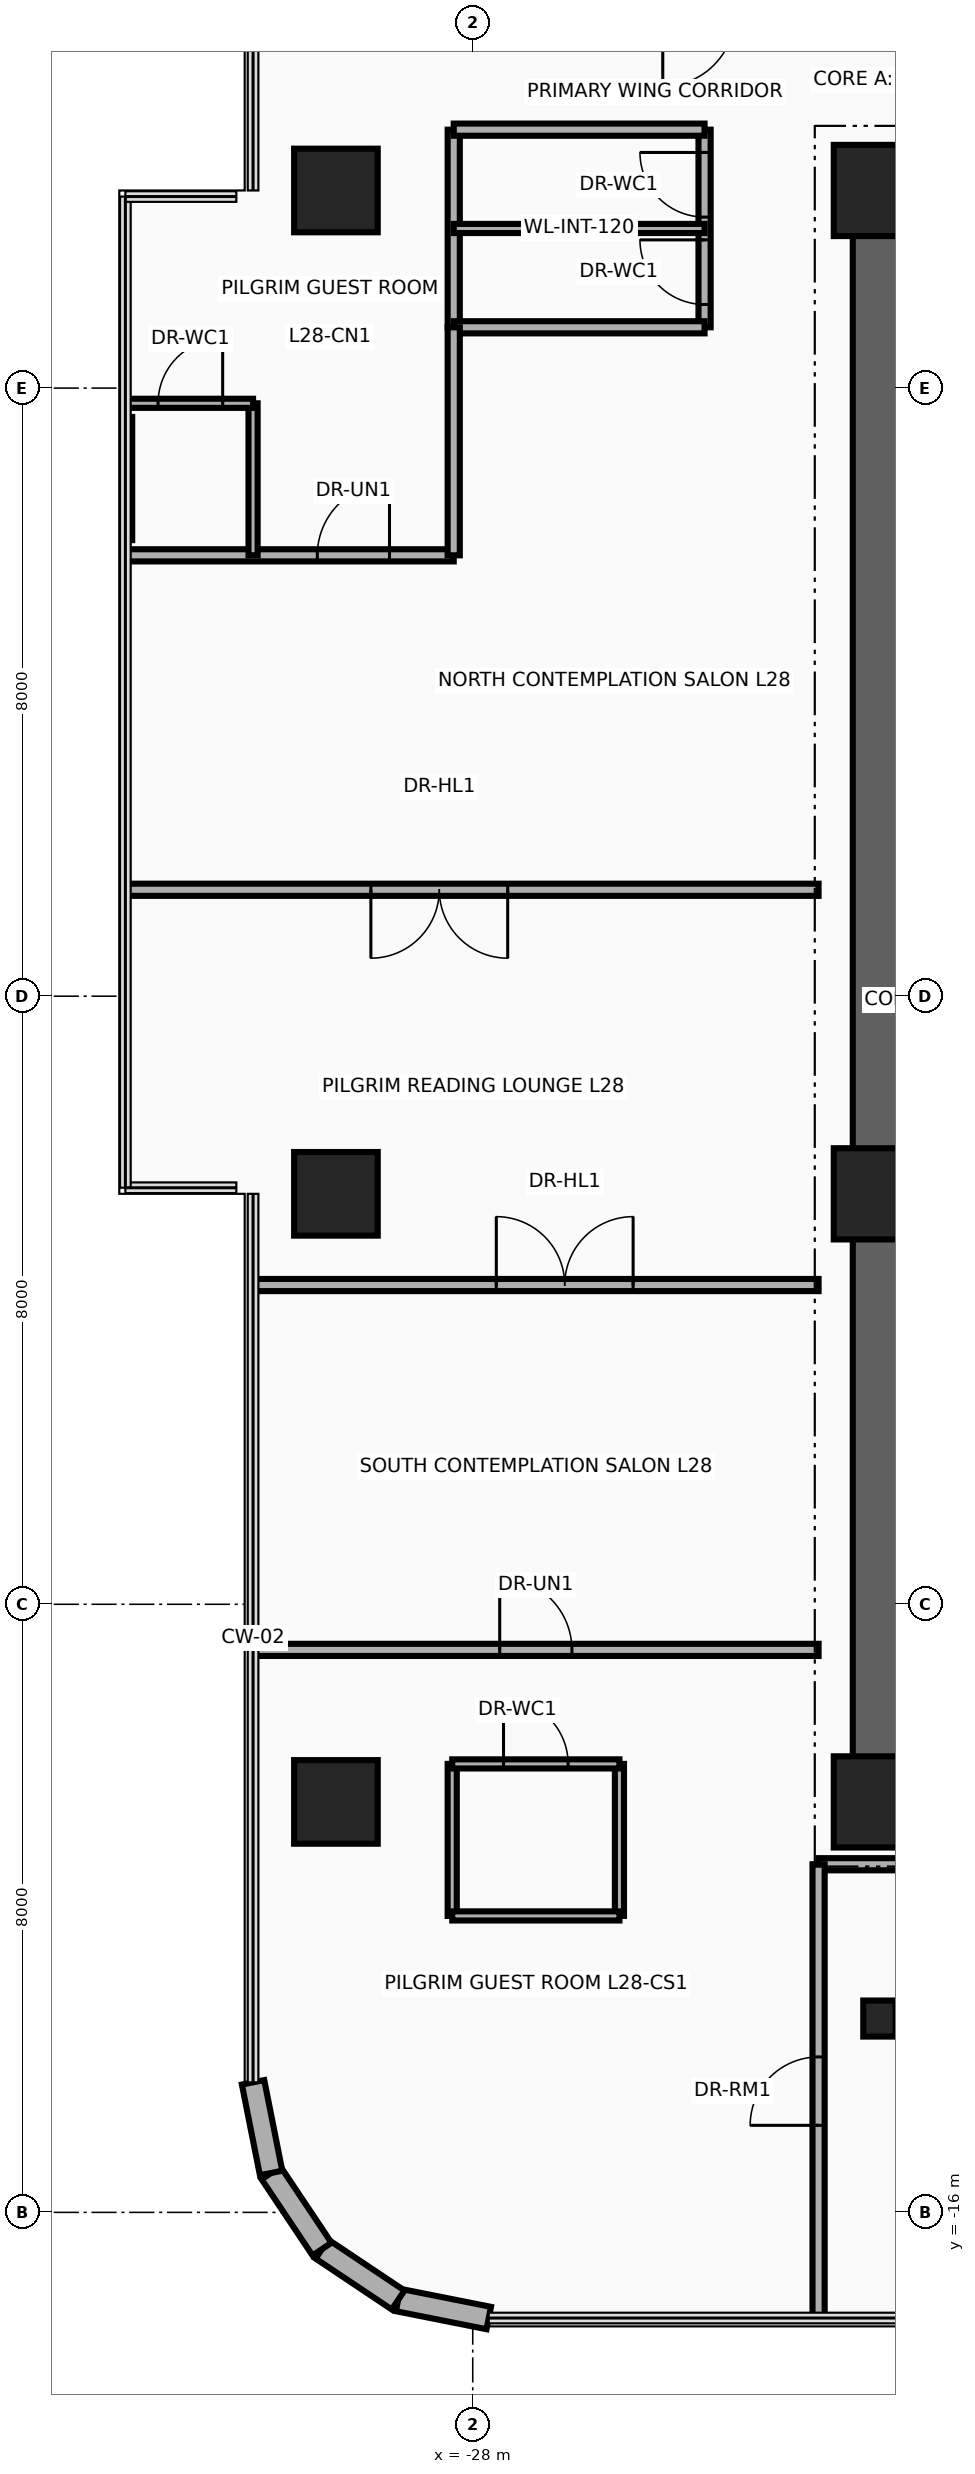
"""IFC4 building model, lengths in metres.
Left out: names, types, materials, properties, quantities, classifications, styles, units other than length and angle.
Written with IfcOpenShell. Run it as: python <this file> out.ifc"""

import sys

from ifc_helpers import new_model, si_unit, direction, frame, frame_2d, origin, origin_2d, place, context, subcontext, project, spatial, rectangle, circle, i_section, extrude, source, transform, mapped, element, fill, save


model = new_model("IFC4")
c1 = context("Model", 3, precision=1e-05, world=origin(), true_north=direction((0.0, 1.0)))
c2 = subcontext(c1, "Body", "Model", "MODEL_VIEW")
j1 = project(units=[si_unit("LENGTHUNIT", "METRE"), si_unit("PLANEANGLEUNIT", "RADIAN")], contexts=[c1])
p1 = place(None, origin())
s1 = spatial("IfcSite", under=j1, at=p1, CompositionType="ELEMENT")
p2 = place(p1, origin())
s2 = spatial("IfcBuilding", under=s1, at=p2, CompositionType="ELEMENT")
p3 = place(p2, frame((0.0, 0.0, 113.1)))
s3 = spatial("IfcBuildingStorey", under=s2, at=p3, CompositionType="ELEMENT", Elevation=113.1)
p4 = place(p3, frame((-22.65, -11.15, 0.0), z_axis=(0.0, 0.0, 1.0), x_axis=(0.0, 1.0, 0.0)))
e1 = element("IfcWall", 1, at=p4, inside=s3, PredefinedType="SHEAR", context=c2, shape_type="SweptSolid", body=[
    extrude(rectangle(XDim=22.3, YDim=0.7, at=frame_2d((11.15, 0.0))), origin(), (0.0, 0.0, 1.0), 3.46),
])
for number, where, z_axis, x_axis in (
    (2, (-22.65, 10.8, 0.0), (0.0, 0.0, 1.0), (1.0, 0.0, 0.0)),
    (3, (-22.65, -10.8, 0.0), (0.0, 0.0, 1.0), (1.0, 0.0, 0.0)),
):
    element("IfcWall", number, at=place(p3, frame(where, z_axis=z_axis, x_axis=x_axis)), inside=s3, PredefinedType="SHEAR", context=c2, shape_type="SweptSolid", body=[
        extrude(rectangle(XDim=10.25, YDim=0.7, at=frame_2d((5.125, 0.0))), origin(), (0.0, 0.0, 1.0), 3.46),
    ])
m1 = source(origin(), c2, "Body", "SweptSolid", [
    extrude(circle(Radius=0.55, at=origin_2d()), origin(), (0.0, 0.0, 1.0), 3.7),
])
p5 = place(p3, frame((-29.8, -10.6, 0.0), z_axis=(0.0, 0.0, 1.0), x_axis=(1.0, 0.0, 0.0)))
e4 = element("IfcColumn", 4, at=p5, inside=s3, PredefinedType="COLUMN", context=c2, shape_type="MappedRepresentation", body=[
    mapped(m1, transform((0.0, 0.0, 0.0), x_axis=(1.0, 0.0, 0.0), y_axis=(0.0, 1.0, 0.0), z_axis=(0.0, 0.0, 1.0), scale=1.0)),
])
m2 = source(origin(), c2, "Body", "SweptSolid", [
    extrude(rectangle(XDim=1.2, YDim=1.2, at=origin_2d()), origin(), (0.0, 0.0, 1.0), 3.7),
])
p6 = place(p3, frame((-22.65, -10.6, 0.0), z_axis=(0.0, 0.0, 1.0), x_axis=(1.0, 0.0, 0.0)))
e5 = element("IfcColumn", 5, at=p6, inside=s3, PredefinedType="COLUMN", context=c2, shape_type="MappedRepresentation", body=[
    mapped(m2, transform((0.0, 0.0, 0.0), x_axis=(1.0, 0.0, 0.0), y_axis=(0.0, 1.0, 0.0), z_axis=(0.0, 0.0, 1.0), scale=1.0)),
])
p7 = place(p3, frame((-29.8, -2.6, 0.0), z_axis=(0.0, 0.0, 1.0), x_axis=(1.0, 0.0, 0.0)))
e6 = element("IfcColumn", 6, at=p7, inside=s3, PredefinedType="COLUMN", context=c2, shape_type="MappedRepresentation", body=[
    mapped(m1, transform((0.0, 0.0, 0.0), x_axis=(1.0, 0.0, 0.0), y_axis=(0.0, 1.0, 0.0), z_axis=(0.0, 0.0, 1.0), scale=1.0)),
])
p8 = place(p3, frame((-22.65, -2.6, 0.0), z_axis=(0.0, 0.0, 1.0), x_axis=(1.0, 0.0, 0.0)))
e7 = element("IfcColumn", 7, at=p8, inside=s3, PredefinedType="COLUMN", context=c2, shape_type="MappedRepresentation", body=[
    mapped(m2, transform((0.0, 0.0, 0.0), x_axis=(1.0, 0.0, 0.0), y_axis=(0.0, 1.0, 0.0), z_axis=(0.0, 0.0, 1.0), scale=1.0)),
])
p9 = place(p3, frame((-29.8, 10.6, 0.0), z_axis=(0.0, 0.0, 1.0), x_axis=(1.0, 0.0, 0.0)))
e8 = element("IfcColumn", 8, at=p9, inside=s3, PredefinedType="COLUMN", context=c2, shape_type="MappedRepresentation", body=[
    mapped(m1, transform((0.0, 0.0, 0.0), x_axis=(1.0, 0.0, 0.0), y_axis=(0.0, 1.0, 0.0), z_axis=(0.0, 0.0, 1.0), scale=1.0)),
])
p10 = place(p3, frame((-22.65, 10.6, 0.0), z_axis=(0.0, 0.0, 1.0), x_axis=(1.0, 0.0, 0.0)))
e9 = element("IfcColumn", 9, at=p10, inside=s3, PredefinedType="COLUMN", context=c2, shape_type="MappedRepresentation", body=[
    mapped(m2, transform((0.0, 0.0, 0.0), x_axis=(1.0, 0.0, 0.0), y_axis=(0.0, 1.0, 0.0), z_axis=(0.0, 0.0, 1.0), scale=1.0)),
])
m3 = source(origin(), c2, "Body", "SweptSolid", [
    extrude(i_section(OverallWidth=0.424, OverallDepth=0.474, WebThickness=0.048, FlangeThickness=0.077, at=origin_2d()), origin(), (0.0, 0.0, 1.0), 3.7),
])
p11 = place(p3, frame((-22.65, -13.45, 0.0), z_axis=(0.0, 0.0, 1.0), x_axis=(1.0, 0.0, 0.0)))
e10 = element("IfcColumn", 10, at=p11, inside=s3, PredefinedType="COLUMN", context=c2, shape_type="MappedRepresentation", body=[
    mapped(m3, transform((0.0, 0.0, 0.0), x_axis=(1.0, 0.0, 0.0), y_axis=(0.0, 1.0, 0.0), z_axis=(0.0, 0.0, 1.0), scale=1.0)),
])
p12 = place(p3, frame((-27.789, -17.39, 0.0), z_axis=(0.0, 0.0, 1.0), x_axis=(-0.980804027463, 0.194996050505, 0.0)))
e11 = element("IfcWall", 11, at=p12, inside=s3, PredefinedType="SOLIDWALL", context=c2, shape_type="SweptSolid", body=[
    extrude(rectangle(XDim=1.216, YDim=0.3, at=frame_2d((0.608, 0.0))), origin(), (0.0, 0.0, 1.0), 3.46),
])
for number, where, z_axis, x_axis in (
    (12, (-28.982, -17.153, 0.0), (0.0, 0.0, 1.0), (-0.831, 0.556, 0.0)),
    (13, (-29.983, -16.483, 0.0), (0.0, 0.0, 1.0), (-0.556, 0.831, 0.0)),
):
    element("IfcWall", number, at=place(p3, frame(where, z_axis=z_axis, x_axis=x_axis)), inside=s3, PredefinedType="SOLIDWALL", context=c2, shape_type="SweptSolid", body=[
        extrude(rectangle(XDim=1.205, YDim=0.3, at=frame_2d((0.603, 0.0))), origin(), (0.0, 0.0, 1.0), 3.46),
    ])
p13 = place(p3, frame((-30.653, -15.482, 0.0), z_axis=(0.0, 0.0, 1.0), x_axis=(-0.194996050505, 0.980804027463, 0.0)))
e14 = element("IfcWall", 14, at=p13, inside=s3, PredefinedType="SOLIDWALL", context=c2, shape_type="SweptSolid", body=[
    extrude(rectangle(XDim=1.216, YDim=0.3, at=frame_2d((0.608, 0.0))), origin(), (0.0, 0.0, 1.0), 3.46),
])
p14 = place(p3, frame((-28.25, 8.8, 0.0), z_axis=(0.0, 0.0, 1.0), x_axis=(0.0, 1.0, 0.0)))
e15 = element("IfcWall", 15, at=p14, inside=s3, PredefinedType="PARTITIONING", context=c2, shape_type="SweptSolid", body=[
    extrude(rectangle(XDim=2.6, YDim=0.16, at=frame_2d((1.3, 0.0))), origin(), (0.0, 0.0, 1.0), 2.666),
])
p15 = place(p3, frame((-24.95, 8.8, 0.0), z_axis=(0.0, 0.0, 1.0), x_axis=(0.0, 1.0, 0.0)))
e16 = element("IfcWall", 16, at=p15, inside=s3, PredefinedType="PARTITIONING", context=c2, shape_type="SweptSolid", body=[
    extrude(rectangle(XDim=2.6, YDim=0.16, at=frame_2d((1.3, 0.0))), origin(), (0.0, 0.0, 1.0), 2.666),
])
p16 = place(p15, frame((0.3, 0.0, 0.0)))
e17 = element("IfcOpeningElement", 17, at=p16, cuts=e16, PredefinedType="OPENING", context=c2, shape_type="SweptSolid", body=[
    extrude(rectangle(XDim=0.85, YDim=2.1, at=frame_2d((0.425, 1.05))), frame((0.0, 0.095, 0.0), z_axis=(0.0, -1.0, 0.0), x_axis=(1.0, 0.0, 0.0)), (0.0, 0.0, 1.0), 0.19),
])
p17 = place(p15, frame((1.45, 0.0, 0.0)))
e18 = element("IfcOpeningElement", 18, at=p17, cuts=e16, PredefinedType="OPENING", context=c2, shape_type="SweptSolid", body=[
    extrude(rectangle(XDim=0.85, YDim=2.1, at=frame_2d((0.425, 1.05))), frame((0.0, 0.095, 0.0), z_axis=(0.0, -1.0, 0.0), x_axis=(1.0, 0.0, 0.0)), (0.0, 0.0, 1.0), 0.19),
])
for number, where, z_axis, x_axis in (
    (19, (-28.25, 8.8, 0.0), (0.0, 0.0, 1.0), (1.0, 0.0, 0.0)),
    (20, (-28.25, 11.4, 0.0), (0.0, 0.0, 1.0), (1.0, 0.0, 0.0)),
):
    element("IfcWall", number, at=place(p3, frame(where, z_axis=z_axis, x_axis=x_axis)), inside=s3, PredefinedType="PARTITIONING", context=c2, shape_type="SweptSolid", body=[
        extrude(rectangle(XDim=3.3, YDim=0.16, at=frame_2d((1.65, 0.0))), origin(), (0.0, 0.0, 1.0), 3.46),
    ])
p18 = place(p3, frame((-28.25, 10.1, 0.0), z_axis=(0.0, 0.0, 1.0), x_axis=(1.0, 0.0, 0.0)))
e21 = element("IfcWall", 21, at=p18, inside=s3, PredefinedType="PARTITIONING", context=c2, shape_type="SweptSolid", body=[
    extrude(rectangle(XDim=3.3, YDim=0.12, at=frame_2d((1.65, 0.0))), origin(), (0.0, 0.0, 1.0), 3.46),
])
p19 = place(p3, frame((-23.45, -11.42, 0.0), z_axis=(0.0, 0.0, 1.0), x_axis=(1.0, 0.0, 0.0)))
e22 = element("IfcWall", 22, at=p19, inside=s3, PredefinedType="PARTITIONING", context=c2, shape_type="SweptSolid", body=[
    extrude(rectangle(XDim=13.84, YDim=0.16, at=frame_2d((6.92, 0.0))), origin(), (0.0, 0.0, 1.0), 2.834),
])
p20 = place(p3, frame((-23.45, -17.39, 0.0), z_axis=(0.0, 0.0, 1.0), x_axis=(0.0, 1.0, 0.0)))
e23 = element("IfcWall", 23, at=p20, inside=s3, PredefinedType="PARTITIONING", context=c2, shape_type="SweptSolid", body=[
    extrude(rectangle(XDim=5.97, YDim=0.16, at=frame_2d((2.985, 0.0))), origin(), (0.0, 0.0, 1.0), 3.46),
])
p21 = place(p20, frame((2.535, 0.0, 0.0)))
e24 = element("IfcOpeningElement", 24, at=p21, cuts=e23, PredefinedType="OPENING", context=c2, shape_type="SweptSolid", body=[
    extrude(rectangle(XDim=0.9, YDim=2.1, at=frame_2d((0.45, 1.05))), frame((0.0, 0.095, 0.0), z_axis=(0.0, -1.0, 0.0), x_axis=(1.0, 0.0, 0.0)), (0.0, 0.0, 1.0), 0.19),
])
p22 = place(p3, frame((-30.89, -8.6, 0.0), z_axis=(0.0, 0.0, 1.0), x_axis=(1.0, 0.0, 0.0)))
e25 = element("IfcWall", 25, at=p22, inside=s3, PredefinedType="PARTITIONING", context=c2, shape_type="SweptSolid", body=[
    extrude(rectangle(XDim=7.44, YDim=0.16, at=frame_2d((3.72, 0.0))), origin(), (0.0, 0.0, 1.0), 2.896),
])
p23 = place(p22, frame((3.245, 0.0, 0.0)))
e26 = element("IfcOpeningElement", 26, at=p23, cuts=e25, PredefinedType="OPENING", context=c2, shape_type="SweptSolid", body=[
    extrude(rectangle(XDim=0.95, YDim=2.15, at=frame_2d((0.475, 1.075))), frame((0.0, 0.095, 0.0), z_axis=(0.0, -1.0, 0.0), x_axis=(1.0, 0.0, 0.0)), (0.0, 0.0, 1.0), 0.19),
])
p24 = place(p3, frame((-32.54, 5.8, 0.0), z_axis=(0.0, 0.0, 1.0), x_axis=(1.0, 0.0, 0.0)))
e27 = element("IfcWall", 27, at=p24, inside=s3, PredefinedType="PARTITIONING", context=c2, shape_type="SweptSolid", body=[
    extrude(rectangle(XDim=4.29, YDim=0.16, at=frame_2d((2.145, 0.0))), origin(), (0.0, 0.0, 1.0), 2.896),
])
p25 = place(p24, frame((2.495, 0.0, 0.0)))
e28 = element("IfcOpeningElement", 28, at=p25, cuts=e27, PredefinedType="OPENING", context=c2, shape_type="SweptSolid", body=[
    extrude(rectangle(XDim=0.95, YDim=2.15, at=frame_2d((0.475, 1.075))), frame((0.0, 0.095, 0.0), z_axis=(0.0, -1.0, 0.0), x_axis=(1.0, 0.0, 0.0)), (0.0, 0.0, 1.0), 0.19),
])
p26 = place(p3, frame((-28.25, 5.8, 0.0), z_axis=(0.0, 0.0, 1.0), x_axis=(0.0, 1.0, 0.0)))
e29 = element("IfcWall", 29, at=p26, inside=s3, PredefinedType="PARTITIONING", context=c2, shape_type="SweptSolid", body=[
    extrude(rectangle(XDim=3.0, YDim=0.16, at=frame_2d((1.5, 0.0))), origin(), (0.0, 0.0, 1.0), 2.988),
])
for number, where, z_axis, x_axis in (
    (30, (-28.27, -12.1, 0.0), (0.0, 0.0, 1.0), (0.0, 1.0, 0.0)),
    (31, (-26.07, -12.1, 0.0), (0.0, 0.0, 1.0), (0.0, 1.0, 0.0)),
):
    element("IfcWall", number, at=place(p3, frame(where, z_axis=z_axis, x_axis=x_axis)), inside=s3, PredefinedType="PARTITIONING", context=c2, shape_type="SweptSolid", body=[
        extrude(rectangle(XDim=2.0, YDim=0.12, at=frame_2d((1.0, 0.0))), origin(), (0.0, 0.0, 1.0), 2.666),
    ])
p27 = place(p3, frame((-28.27, -12.1, 0.0), z_axis=(0.0, 0.0, 1.0), x_axis=(1.0, 0.0, 0.0)))
e32 = element("IfcWall", 32, at=p27, inside=s3, PredefinedType="PARTITIONING", context=c2, shape_type="SweptSolid", body=[
    extrude(rectangle(XDim=2.2, YDim=0.12, at=frame_2d((1.1, 0.0))), origin(), (0.0, 0.0, 1.0), 3.46),
])
p28 = place(p3, frame((-28.27, -10.1, 0.0), z_axis=(0.0, 0.0, 1.0), x_axis=(1.0, 0.0, 0.0)))
e33 = element("IfcWall", 33, at=p28, inside=s3, PredefinedType="PARTITIONING", context=c2, shape_type="SweptSolid", body=[
    extrude(rectangle(XDim=2.2, YDim=0.12, at=frame_2d((1.1, 0.0))), origin(), (0.0, 0.0, 1.0), 3.46),
])
p29 = place(p28, frame((0.675, 0.0, 0.0)))
e34 = element("IfcOpeningElement", 34, at=p29, cuts=e33, PredefinedType="OPENING", context=c2, shape_type="SweptSolid", body=[
    extrude(rectangle(XDim=0.85, YDim=2.1, at=frame_2d((0.425, 1.05))), frame((0.0, 0.075, 0.0), z_axis=(0.0, -1.0, 0.0), x_axis=(1.0, 0.0, 0.0)), (0.0, 0.0, 1.0), 0.15),
])
p30 = place(p3, frame((-30.89, 5.8, 0.0), z_axis=(0.0, 0.0, 1.0), x_axis=(0.0, 1.0, 0.0)))
e35 = element("IfcWall", 35, at=p30, inside=s3, PredefinedType="PARTITIONING", context=c2, shape_type="SweptSolid", body=[
    extrude(rectangle(XDim=2.0, YDim=0.12, at=frame_2d((1.0, 0.0))), origin(), (0.0, 0.0, 1.0), 3.46),
])
p31 = place(p3, frame((-32.54, 7.8, 0.0), z_axis=(0.0, 0.0, 1.0), x_axis=(1.0, 0.0, 0.0)))
e36 = element("IfcWall", 36, at=p31, inside=s3, PredefinedType="PARTITIONING", context=c2, shape_type="SweptSolid", body=[
    extrude(rectangle(XDim=1.65, YDim=0.12, at=frame_2d((0.825, 0.0))), origin(), (0.0, 0.0, 1.0), 3.46),
])
p32 = place(p31, frame((0.4, 0.0, 0.0)))
e37 = element("IfcOpeningElement", 37, at=p32, cuts=e36, PredefinedType="OPENING", context=c2, shape_type="SweptSolid", body=[
    extrude(rectangle(XDim=0.85, YDim=2.1, at=frame_2d((0.425, 1.05))), frame((0.0, 0.075, 0.0), z_axis=(0.0, -1.0, 0.0), x_axis=(1.0, 0.0, 0.0)), (0.0, 0.0, 1.0), 0.15),
])
p33 = place(p3, frame((-32.54, 6.0, 0.0), z_axis=(0.0, 0.0, 1.0), x_axis=(0.0, 1.0, 0.0)))
e38 = element("IfcWall", 38, at=p33, inside=s3, PredefinedType="PARTITIONING", context=c2, shape_type="SweptSolid", body=[
    extrude(rectangle(XDim=1.62, YDim=0.12, at=frame_2d((0.81, 0.0))), origin(), (0.0, 0.0, 1.0), 3.46),
])
p34 = place(p3, frame((-30.89, -3.8, 0.0), z_axis=(0.0, 0.0, 1.0), x_axis=(1.0, 0.0, 0.0)))
e39 = element("IfcWall", 39, at=p34, inside=s3, PredefinedType="PARTITIONING", context=c2, shape_type="SweptSolid", body=[
    extrude(rectangle(XDim=7.44, YDim=0.16, at=frame_2d((3.72, 0.0))), origin(), (0.0, 0.0, 1.0), 2.896),
])
p35 = place(p34, frame((3.2, 0.0, 0.0)))
e40 = element("IfcOpeningElement", 40, at=p35, cuts=e39, PredefinedType="OPENING", context=c2, shape_type="SweptSolid", body=[
    extrude(rectangle(XDim=1.8, YDim=2.15, at=frame_2d((0.9, 1.075))), frame((0.0, 0.095, 0.0), z_axis=(0.0, -1.0, 0.0), x_axis=(1.0, 0.0, 0.0)), (0.0, 0.0, 1.0), 0.19),
])
p36 = place(p3, frame((-32.54, 1.4, 0.0), z_axis=(0.0, 0.0, 1.0), x_axis=(1.0, 0.0, 0.0)))
e41 = element("IfcWall", 41, at=p36, inside=s3, PredefinedType="PARTITIONING", context=c2, shape_type="SweptSolid", body=[
    extrude(rectangle(XDim=9.09, YDim=0.16, at=frame_2d((4.545, 0.0))), origin(), (0.0, 0.0, 1.0), 2.896),
])
p37 = place(p36, frame((3.2, 0.0, 0.0)))
e42 = element("IfcOpeningElement", 42, at=p37, cuts=e41, PredefinedType="OPENING", context=c2, shape_type="SweptSolid", body=[
    extrude(rectangle(XDim=1.8, YDim=2.15, at=frame_2d((0.9, 1.075))), frame((0.0, 0.095, 0.0), z_axis=(0.0, -1.0, 0.0), x_axis=(1.0, 0.0, 0.0)), (0.0, 0.0, 1.0), 0.19),
])
p38 = place(p16, origin())
e43 = element("IfcDoor", 43, at=p38, inside=s3, OperationType="SINGLE_SWING_RIGHT", PredefinedType="DOOR", context=c2, shape_type="SweptSolid", body=[
    extrude(rectangle(XDim=0.85, YDim=2.1, at=frame_2d((0.425, 1.05))), frame((0.0, 0.025, 0.0), z_axis=(0.0, -1.0, 0.0), x_axis=(1.0, 0.0, 0.0)), (0.0, 0.0, 1.0), 0.05),
])
fill(e17, e43)
p39 = place(p17, origin())
e44 = element("IfcDoor", 44, at=p39, inside=s3, OperationType="SINGLE_SWING_LEFT", PredefinedType="DOOR", context=c2, shape_type="SweptSolid", body=[
    extrude(rectangle(XDim=0.85, YDim=2.1, at=frame_2d((0.425, 1.05))), frame((0.0, 0.025, 0.0), z_axis=(0.0, -1.0, 0.0), x_axis=(1.0, 0.0, 0.0)), (0.0, 0.0, 1.0), 0.05),
])
fill(e18, e44)
p40 = place(p23, origin())
e45 = element("IfcDoor", 45, at=p40, inside=s3, OperationType="SINGLE_SWING_RIGHT", PredefinedType="DOOR", context=c2, shape_type="SweptSolid", body=[
    extrude(rectangle(XDim=0.95, YDim=2.15, at=frame_2d((0.475, 1.075))), frame((0.0, 0.025, 0.0), z_axis=(0.0, -1.0, 0.0), x_axis=(1.0, 0.0, 0.0)), (0.0, 0.0, 1.0), 0.05),
])
fill(e26, e45)
p41 = place(p29, origin())
e46 = element("IfcDoor", 46, at=p41, inside=s3, OperationType="SINGLE_SWING_LEFT", PredefinedType="DOOR", context=c2, shape_type="SweptSolid", body=[
    extrude(rectangle(XDim=0.85, YDim=2.1, at=frame_2d((0.425, 1.05))), frame((0.0, 0.025, 0.0), z_axis=(0.0, -1.0, 0.0), x_axis=(1.0, 0.0, 0.0)), (0.0, 0.0, 1.0), 0.05),
])
fill(e34, e46)
p42 = place(p25, origin())
e47 = element("IfcDoor", 47, at=p42, inside=s3, OperationType="SINGLE_SWING_RIGHT", PredefinedType="DOOR", context=c2, shape_type="SweptSolid", body=[
    extrude(rectangle(XDim=0.95, YDim=2.15, at=frame_2d((0.475, 1.075))), frame((0.0, 0.025, 0.0), z_axis=(0.0, -1.0, 0.0), x_axis=(1.0, 0.0, 0.0)), (0.0, 0.0, 1.0), 0.05),
])
fill(e28, e47)
p43 = place(p32, origin())
e48 = element("IfcDoor", 48, at=p43, inside=s3, OperationType="SINGLE_SWING_LEFT", PredefinedType="DOOR", context=c2, shape_type="SweptSolid", body=[
    extrude(rectangle(XDim=0.85, YDim=2.1, at=frame_2d((0.425, 1.05))), frame((0.0, 0.025, 0.0), z_axis=(0.0, -1.0, 0.0), x_axis=(1.0, 0.0, 0.0)), (0.0, 0.0, 1.0), 0.05),
])
fill(e37, e48)
p44 = place(p35, origin())
e49 = element("IfcDoor", 49, at=p44, inside=s3, OperationType="DOUBLE_DOOR_SINGLE_SWING", PredefinedType="DOOR", context=c2, shape_type="SweptSolid", body=[
    extrude(rectangle(XDim=1.8, YDim=2.15, at=frame_2d((0.9, 1.075))), frame((0.0, 0.025, 0.0), z_axis=(0.0, -1.0, 0.0), x_axis=(1.0, 0.0, 0.0)), (0.0, 0.0, 1.0), 0.05),
])
fill(e40, e49)
p45 = place(p37, frame((1.8, 0.0, 0.0), z_axis=(0.0, 0.0, 1.0), x_axis=(-1.0, 0.0, 0.0)))
e50 = element("IfcDoor", 50, at=p45, inside=s3, OperationType="DOUBLE_DOOR_SINGLE_SWING", PredefinedType="DOOR", context=c2, shape_type="SweptSolid", body=[
    extrude(rectangle(XDim=1.8, YDim=2.15, at=frame_2d((0.9, 1.075))), frame((0.0, 0.025, 0.0), z_axis=(0.0, -1.0, 0.0), x_axis=(1.0, 0.0, 0.0)), (0.0, 0.0, 1.0), 0.05),
])
fill(e42, e50)
p46 = place(p21, origin())
e51 = element("IfcDoor", 51, at=p46, inside=s3, OperationType="SINGLE_SWING_RIGHT", PredefinedType="DOOR", context=c2, shape_type="SweptSolid", body=[
    extrude(rectangle(XDim=0.9, YDim=2.1, at=frame_2d((0.45, 1.05))), frame((0.0, 0.025, 0.0), z_axis=(0.0, -1.0, 0.0), x_axis=(1.0, 0.0, 0.0)), (0.0, 0.0, 1.0), 0.05),
])
fill(e24, e51)
save(model, sys.argv[1])
